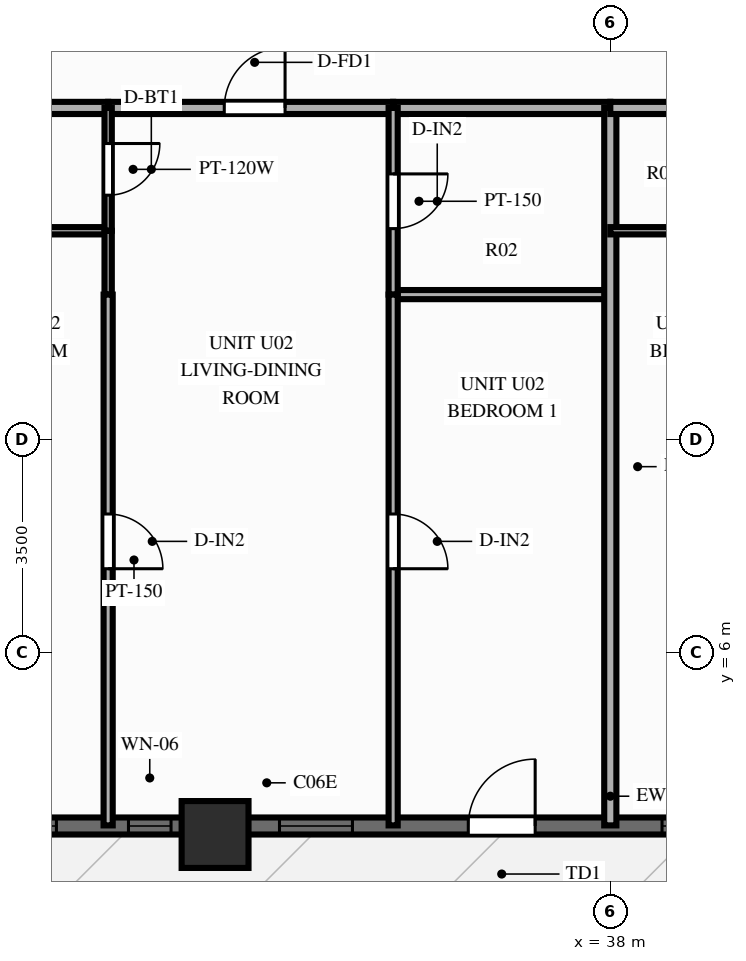
"""IFC4 building model, lengths in metres.
Left out: names, types, materials, properties, quantities, classifications, styles, units other than length and angle.
Written with IfcOpenShell. Run it as: python <this file> out.ifc"""

import sys

from ifc_helpers import new_model, si_unit, direction, frame, frame_2d, origin, origin_2d, place, context, subcontext, project, spatial, rectangle, extrude, source, transform, mapped, element, fill, save


model = new_model("IFC4")
c1 = context("Model", 3, precision=1e-05, world=origin(), true_north=direction((0.0, 1.0)))
c2 = subcontext(c1, "Body", "Model", "MODEL_VIEW")
j1 = project(units=[si_unit("LENGTHUNIT", "METRE"), si_unit("PLANEANGLEUNIT", "RADIAN")], contexts=[c1])
p1 = place(None, origin())
s1 = spatial("IfcSite", under=j1, at=p1, CompositionType="ELEMENT")
p2 = place(p1, origin())
s2 = spatial("IfcBuilding", under=s1, at=p2, CompositionType="ELEMENT")
p3 = place(p2, frame((0.0, 0.0, 43.4)))
s3 = spatial("IfcBuildingStorey", under=s2, at=p3, CompositionType="ELEMENT", Elevation=43.4)
m1 = source(origin(), c2, "Body", "SweptSolid", [
    extrude(rectangle(XDim=1.1, YDim=1.1, at=origin_2d()), origin(), (0.0, 0.0, 1.0), 3.0),
])
p4 = place(p3, frame((31.5, 3.0, 0.0), z_axis=(0.0, 0.0, 1.0), x_axis=(1.0, 0.0, 0.0)))
e1 = element("IfcColumn", 1, at=p4, inside=s3, PredefinedType="COLUMN", context=c2, shape_type="MappedRepresentation", body=[
    mapped(m1, transform((0.0, 0.0, 0.0), scale=1.0)),
])
p5 = place(p3, frame((15.5, 3.14, 0.0), z_axis=(0.0, 0.0, 1.0), x_axis=(1.0, 0.0, 0.0)))
e2 = element("IfcWall", 2, at=p5, inside=s3, PredefinedType="SOLIDWALL", context=c2, shape_type="SweptSolid", body=[
    extrude(rectangle(XDim=45.0, YDim=0.28, at=frame_2d((22.5, 0.0))), origin(), (0.0, 0.0, 1.0), 2.28),
])
p6 = place(p5, frame((1.136, 0.0, 0.25)))
e3 = element("IfcOpeningElement", 3, at=p6, cuts=e2, PredefinedType="OPENING", context=c2, shape_type="SweptSolid", body=[
    extrude(rectangle(XDim=1.2, YDim=1.5, at=frame_2d((0.6, 0.75))), frame((0.0, 0.152, 0.0), z_axis=(0.0, -1.0, 0.0), x_axis=(1.0, 0.0, 0.0)), (0.0, 0.0, 1.0), 0.304),
])
p7 = place(p5, frame((4.825, 0.0, 0.25)))
e4 = element("IfcOpeningElement", 4, at=p7, cuts=e2, PredefinedType="OPENING", context=c2, shape_type="SweptSolid", body=[
    extrude(rectangle(XDim=1.2, YDim=1.5, at=frame_2d((0.6, 0.75))), frame((0.0, 0.152, 0.0), z_axis=(0.0, -1.0, 0.0), x_axis=(1.0, 0.0, 0.0)), (0.0, 0.0, 1.0), 0.304),
])
p8 = place(p5, frame((8.954, 0.0, 0.25)))
e5 = element("IfcOpeningElement", 5, at=p8, cuts=e2, PredefinedType="OPENING", context=c2, shape_type="SweptSolid", body=[
    extrude(rectangle(XDim=1.2, YDim=1.5, at=frame_2d((0.6, 0.75))), frame((0.0, 0.152, 0.0), z_axis=(0.0, -1.0, 0.0), x_axis=(1.0, 0.0, 0.0)), (0.0, 0.0, 1.0), 0.304),
])
p9 = place(p5, frame((12.191, 0.0, 0.25)))
e6 = element("IfcOpeningElement", 6, at=p9, cuts=e2, PredefinedType="OPENING", context=c2, shape_type="SweptSolid", body=[
    extrude(rectangle(XDim=1.2, YDim=1.5, at=frame_2d((0.6, 0.75))), frame((0.0, 0.152, 0.0), z_axis=(0.0, -1.0, 0.0), x_axis=(1.0, 0.0, 0.0)), (0.0, 0.0, 1.0), 0.304),
])
p10 = place(p5, frame((14.576, 0.0, 0.25)))
e7 = element("IfcOpeningElement", 7, at=p10, cuts=e2, PredefinedType="OPENING", context=c2, shape_type="SweptSolid", body=[
    extrude(rectangle(XDim=0.7, YDim=1.5, at=frame_2d((0.35, 0.75))), frame((0.0, 0.152, 0.0), z_axis=(0.0, -1.0, 0.0), x_axis=(1.0, 0.0, 0.0)), (0.0, 0.0, 1.0), 0.304),
])
p11 = place(p5, frame((17.059, 0.0, 0.25)))
e8 = element("IfcOpeningElement", 8, at=p11, cuts=e2, PredefinedType="OPENING", context=c2, shape_type="SweptSolid", body=[
    extrude(rectangle(XDim=1.2, YDim=1.5, at=frame_2d((0.6, 0.75))), frame((0.0, 0.152, 0.0), z_axis=(0.0, -1.0, 0.0), x_axis=(1.0, 0.0, 0.0)), (0.0, 0.0, 1.0), 0.304),
])
p12 = place(p5, frame((21.264, 0.0, 0.0), z_axis=(0.0, 0.0, 1.0), x_axis=(-1.0, 0.0, 0.0)))
e9 = element("IfcOpeningElement", 9, at=p12, cuts=e2, PredefinedType="OPENING", context=c2, shape_type="SweptSolid", body=[
    extrude(rectangle(XDim=1.1, YDim=2.15, at=frame_2d((0.55, 1.075))), frame((0.0, 0.152, 0.0), z_axis=(0.0, -1.0, 0.0), x_axis=(1.0, 0.0, 0.0)), (0.0, 0.0, 1.0), 0.304),
])
p13 = place(p5, frame((23.351, 0.0, 0.25)))
e10 = element("IfcOpeningElement", 10, at=p13, cuts=e2, PredefinedType="OPENING", context=c2, shape_type="SweptSolid", body=[
    extrude(rectangle(XDim=1.2, YDim=1.5, at=frame_2d((0.6, 0.75))), frame((0.0, 0.152, 0.0), z_axis=(0.0, -1.0, 0.0), x_axis=(1.0, 0.0, 0.0)), (0.0, 0.0, 1.0), 0.304),
])
p14 = place(p5, frame((26.406, 0.0, 0.25)))
e11 = element("IfcOpeningElement", 11, at=p14, cuts=e2, PredefinedType="OPENING", context=c2, shape_type="SweptSolid", body=[
    extrude(rectangle(XDim=1.2, YDim=1.5, at=frame_2d((0.6, 0.75))), frame((0.0, 0.152, 0.0), z_axis=(0.0, -1.0, 0.0), x_axis=(1.0, 0.0, 0.0)), (0.0, 0.0, 1.0), 0.304),
])
p15 = place(p5, frame((31.39, 0.0, 0.25)))
e12 = element("IfcOpeningElement", 12, at=p15, cuts=e2, PredefinedType="OPENING", context=c2, shape_type="SweptSolid", body=[
    extrude(rectangle(XDim=1.2, YDim=1.5, at=frame_2d((0.6, 0.75))), frame((0.0, 0.152, 0.0), z_axis=(0.0, -1.0, 0.0), x_axis=(1.0, 0.0, 0.0)), (0.0, 0.0, 1.0), 0.304),
])
p16 = place(p5, frame((34.511, 0.0, 0.25)))
e13 = element("IfcOpeningElement", 13, at=p16, cuts=e2, PredefinedType="OPENING", context=c2, shape_type="SweptSolid", body=[
    extrude(rectangle(XDim=1.2, YDim=1.5, at=frame_2d((0.6, 0.75))), frame((0.0, 0.152, 0.0), z_axis=(0.0, -1.0, 0.0), x_axis=(1.0, 0.0, 0.0)), (0.0, 0.0, 1.0), 0.304),
])
p17 = place(p5, frame((38.305, 0.0, 0.25)))
e14 = element("IfcOpeningElement", 14, at=p17, cuts=e2, PredefinedType="OPENING", context=c2, shape_type="SweptSolid", body=[
    extrude(rectangle(XDim=1.2, YDim=1.5, at=frame_2d((0.6, 0.75))), frame((0.0, 0.152, 0.0), z_axis=(0.0, -1.0, 0.0), x_axis=(1.0, 0.0, 0.0)), (0.0, 0.0, 1.0), 0.304),
])
p18 = place(p5, frame((42.329, 0.0, 0.25)))
e15 = element("IfcOpeningElement", 15, at=p18, cuts=e2, PredefinedType="OPENING", context=c2, shape_type="SweptSolid", body=[
    extrude(rectangle(XDim=1.2, YDim=1.5, at=frame_2d((0.6, 0.75))), frame((0.0, 0.152, 0.0), z_axis=(0.0, -1.0, 0.0), x_axis=(1.0, 0.0, 0.0)), (0.0, 0.0, 1.0), 0.304),
])
p19 = place(p3, frame((26.84, 14.95, 0.0), z_axis=(0.0, 0.0, 1.0), x_axis=(1.0, 0.0, 0.0)))
e16 = element("IfcWall", 16, at=p19, inside=s3, PredefinedType="PARTITIONING", context=c2, shape_type="SweptSolid", body=[
    extrude(rectangle(XDim=2.902, YDim=0.2, at=frame_2d((1.451, 0.0))), origin(), (0.0, 0.0, 1.0), 2.79),
])
p20 = place(p3, frame((29.742, 14.95, 0.0), z_axis=(0.0, 0.0, 1.0), x_axis=(1.0, 0.0, 0.0)))
e17 = element("IfcWall", 17, at=p20, inside=s3, PredefinedType="PARTITIONING", context=c2, shape_type="SweptSolid", body=[
    extrude(rectangle(XDim=4.687, YDim=0.2, at=frame_2d((2.344, 0.0))), origin(), (0.0, 0.0, 1.0), 2.79),
])
p21 = place(p20, frame((1.91, 0.0, 0.0)))
e18 = element("IfcOpeningElement", 18, at=p21, cuts=e17, PredefinedType="OPENING", context=c2, shape_type="SweptSolid", body=[
    extrude(rectangle(XDim=1.0, YDim=2.15, at=frame_2d((0.5, 1.075))), frame((0.0, 0.112, 0.0), z_axis=(0.0, -1.0, 0.0), x_axis=(1.0, 0.0, 0.0)), (0.0, 0.0, 1.0), 0.224),
])
p22 = place(p3, frame((34.429, 14.95, 0.0), z_axis=(0.0, 0.0, 1.0), x_axis=(1.0, 0.0, 0.0)))
e19 = element("IfcWall", 19, at=p22, inside=s3, PredefinedType="PARTITIONING", context=c2, shape_type="SweptSolid", body=[
    extrude(rectangle(XDim=3.571, YDim=0.2, at=frame_2d((1.786, 0.0))), origin(), (0.0, 0.0, 1.0), 2.79),
])
p23 = place(p3, frame((26.84, 12.93, 0.0), z_axis=(0.0, 0.0, 1.0), x_axis=(1.0, 0.0, 0.0)))
e20 = element("IfcWall", 20, at=p23, inside=s3, PredefinedType="PARTITIONING", context=c2, shape_type="SweptSolid", body=[
    extrude(rectangle(XDim=2.902, YDim=0.12, at=frame_2d((1.451, 0.0))), origin(), (0.0, 0.0, 1.0), 2.79),
])
p24 = place(p3, frame((34.429, 11.88, 0.0), z_axis=(0.0, 0.0, 1.0), x_axis=(1.0, 0.0, 0.0)))
e21 = element("IfcWall", 21, at=p24, inside=s3, PredefinedType="PARTITIONING", context=c2, shape_type="SweptSolid", body=[
    extrude(rectangle(XDim=3.571, YDim=0.15, at=frame_2d((1.786, 0.0))), origin(), (0.0, 0.0, 1.0), 2.79),
])
p25 = place(p3, frame((29.742, 14.95, 0.0), z_axis=(0.0, 0.0, 1.0), x_axis=(0.0, -1.0, 0.0)))
e22 = element("IfcWall", 22, at=p25, inside=s3, PredefinedType="PARTITIONING", context=c2, shape_type="SweptSolid", body=[
    extrude(rectangle(XDim=2.02, YDim=0.12, at=frame_2d((1.01, 0.0))), origin(), (0.0, 0.0, 1.0), 2.79),
])
p26 = place(p25, frame((0.585, 0.0, 0.0)))
e23 = element("IfcOpeningElement", 23, at=p26, cuts=e22, PredefinedType="OPENING", context=c2, shape_type="SweptSolid", body=[
    extrude(rectangle(XDim=0.85, YDim=2.05, at=frame_2d((0.425, 1.025))), frame((0.0, 0.072, 0.0), z_axis=(0.0, -1.0, 0.0), x_axis=(1.0, 0.0, 0.0)), (0.0, 0.0, 1.0), 0.144),
])
p27 = place(p3, frame((29.742, 12.93, 0.0), z_axis=(0.0, 0.0, 1.0), x_axis=(0.0, -1.0, 0.0)))
e24 = element("IfcWall", 24, at=p27, inside=s3, PredefinedType="PARTITIONING", context=c2, shape_type="SweptSolid", body=[
    extrude(rectangle(XDim=1.05, YDim=0.12, at=frame_2d((0.525, 0.0))), origin(), (0.0, 0.0, 1.0), 2.79),
])
p28 = place(p3, frame((29.742, 11.88, 0.0), z_axis=(0.0, 0.0, 1.0), x_axis=(0.0, -1.0, 0.0)))
e25 = element("IfcWall", 25, at=p28, inside=s3, PredefinedType="PARTITIONING", context=c2, shape_type="SweptSolid", body=[
    extrude(rectangle(XDim=8.73, YDim=0.15, at=frame_2d((4.365, 0.0))), origin(), (0.0, 0.0, 1.0), 2.79),
])
p29 = place(p28, frame((3.609, 0.0, 0.0)))
e26 = element("IfcOpeningElement", 26, at=p29, cuts=e25, PredefinedType="OPENING", context=c2, shape_type="SweptSolid", body=[
    extrude(rectangle(XDim=0.9, YDim=2.1, at=frame_2d((0.45, 1.05))), frame((0.0, 0.087, 0.0), z_axis=(0.0, -1.0, 0.0), x_axis=(1.0, 0.0, 0.0)), (0.0, 0.0, 1.0), 0.174),
])
p30 = place(p3, frame((34.429, 14.95, 0.0), z_axis=(0.0, 0.0, 1.0), x_axis=(0.0, -1.0, 0.0)))
e27 = element("IfcWall", 27, at=p30, inside=s3, PredefinedType="PARTITIONING", context=c2, shape_type="SweptSolid", body=[
    extrude(rectangle(XDim=3.07, YDim=0.15, at=frame_2d((1.535, 0.0))), origin(), (0.0, 0.0, 1.0), 2.79),
])
p31 = place(p30, frame((1.085, 0.0, 0.0)))
e28 = element("IfcOpeningElement", 28, at=p31, cuts=e27, PredefinedType="OPENING", context=c2, shape_type="SweptSolid", body=[
    extrude(rectangle(XDim=0.9, YDim=2.1, at=frame_2d((0.45, 1.05))), frame((0.0, 0.087, 0.0), z_axis=(0.0, -1.0, 0.0), x_axis=(1.0, 0.0, 0.0)), (0.0, 0.0, 1.0), 0.174),
])
p32 = place(p3, frame((34.429, 11.88, 0.0), z_axis=(0.0, 0.0, 1.0), x_axis=(0.0, -1.0, 0.0)))
e29 = element("IfcWall", 29, at=p32, inside=s3, PredefinedType="PARTITIONING", context=c2, shape_type="SweptSolid", body=[
    extrude(rectangle(XDim=8.73, YDim=0.15, at=frame_2d((4.365, 0.0))), origin(), (0.0, 0.0, 1.0), 2.79),
])
p33 = place(p32, frame((3.609, 0.0, 0.0)))
e30 = element("IfcOpeningElement", 30, at=p33, cuts=e29, PredefinedType="OPENING", context=c2, shape_type="SweptSolid", body=[
    extrude(rectangle(XDim=0.9, YDim=2.1, at=frame_2d((0.45, 1.05))), frame((0.0, 0.087, 0.0), z_axis=(0.0, -1.0, 0.0), x_axis=(1.0, 0.0, 0.0)), (0.0, 0.0, 1.0), 0.174),
])
p34 = place(p3, frame((38.0, 14.95, 0.0), z_axis=(0.0, 0.0, 1.0), x_axis=(0.0, -1.0, 0.0)))
e31 = element("IfcWall", 31, at=p34, inside=s3, PredefinedType="PARTITIONING", context=c2, shape_type="SweptSolid", body=[
    extrude(rectangle(XDim=11.8, YDim=0.2, at=frame_2d((5.9, 0.0))), origin(), (0.0, 0.0, 1.0), 2.79),
])
p35 = place(p3, frame((38.0, 14.95, 0.0), z_axis=(0.0, 0.0, 1.0), x_axis=(1.0, 0.0, 0.0)))
e32 = element("IfcWall", 32, at=p35, inside=s3, PredefinedType="PARTITIONING", context=c2, shape_type="SweptSolid", body=[
    extrude(rectangle(XDim=2.902, YDim=0.2, at=frame_2d((1.451, 0.0))), origin(), (0.0, 0.0, 1.0), 2.79),
])
p36 = place(p3, frame((38.0, 12.93, 0.0), z_axis=(0.0, 0.0, 1.0), x_axis=(1.0, 0.0, 0.0)))
e33 = element("IfcWall", 33, at=p36, inside=s3, PredefinedType="PARTITIONING", context=c2, shape_type="SweptSolid", body=[
    extrude(rectangle(XDim=2.902, YDim=0.12, at=frame_2d((1.451, 0.0))), origin(), (0.0, 0.0, 1.0), 2.79),
])
m2 = source(origin(), c2, "Body", "SweptSolid", [
    extrude(rectangle(XDim=1.2, YDim=1.5, at=frame_2d((0.6, 0.75))), frame((0.0, 0.03, 0.0), z_axis=(0.0, -1.0, 0.0), x_axis=(1.0, 0.0, 0.0)), (0.0, 0.0, 1.0), 0.06),
])
p37 = place(p9, origin())
e34 = element("IfcWindow", 34, at=p37, inside=s3, PartitioningType="SINGLE_PANEL", PredefinedType="WINDOW", context=c2, shape_type="MappedRepresentation", body=[
    mapped(m2, transform((0.0, 0.0, 0.0), scale=1.0)),
])
fill(e6, e34)
m3 = source(origin(), c2, "Body", "SweptSolid", [
    extrude(rectangle(XDim=0.7, YDim=1.5, at=frame_2d((0.35, 0.75))), frame((0.0, 0.03, 0.0), z_axis=(0.0, -1.0, 0.0), x_axis=(1.0, 0.0, 0.0)), (0.0, 0.0, 1.0), 0.06),
])
p38 = place(p10, origin())
e35 = element("IfcWindow", 35, at=p38, inside=s3, PartitioningType="SINGLE_PANEL", PredefinedType="WINDOW", context=c2, shape_type="MappedRepresentation", body=[
    mapped(m3, transform((0.0, 0.0, 0.0), scale=1.0)),
])
fill(e7, e35)
p39 = place(p11, origin())
e36 = element("IfcWindow", 36, at=p39, inside=s3, PartitioningType="SINGLE_PANEL", PredefinedType="WINDOW", context=c2, shape_type="MappedRepresentation", body=[
    mapped(m2, transform((0.0, 0.0, 0.0), scale=1.0)),
])
fill(e8, e36)
m4 = source(origin(), c2, "Body", "SweptSolid", [
    extrude(rectangle(XDim=1.1, YDim=2.15, at=frame_2d((0.55, 1.075))), frame((0.0, 0.025, 0.0), z_axis=(0.0, -1.0, 0.0), x_axis=(1.0, 0.0, 0.0)), (0.0, 0.0, 1.0), 0.05),
])
p40 = place(p12, origin())
e37 = element("IfcDoor", 37, at=p40, inside=s3, OperationType="SINGLE_SWING_LEFT", PredefinedType="DOOR", context=c2, shape_type="MappedRepresentation", body=[
    mapped(m4, transform((0.0, 0.0, 0.0), scale=1.0)),
])
fill(e9, e37)
p41 = place(p13, origin())
e38 = element("IfcWindow", 38, at=p41, inside=s3, PartitioningType="SINGLE_PANEL", PredefinedType="WINDOW", context=c2, shape_type="MappedRepresentation", body=[
    mapped(m2, transform((0.0, 0.0, 0.0), scale=1.0)),
])
fill(e10, e38)
m5 = source(origin(), c2, "Body", "SweptSolid", [
    extrude(rectangle(XDim=1.0, YDim=2.15, at=frame_2d((0.5, 1.075))), frame((0.0, 0.025, 0.0), z_axis=(0.0, -1.0, 0.0), x_axis=(1.0, 0.0, 0.0)), (0.0, 0.0, 1.0), 0.05),
])
p42 = place(p21, origin())
e39 = element("IfcDoor", 39, at=p42, inside=s3, OperationType="SINGLE_SWING_RIGHT", PredefinedType="DOOR", context=c2, shape_type="MappedRepresentation", body=[
    mapped(m5, transform((0.0, 0.0, 0.0), scale=1.0)),
])
fill(e18, e39)
m6 = source(origin(), c2, "Body", "SweptSolid", [
    extrude(rectangle(XDim=0.85, YDim=2.05, at=frame_2d((0.425, 1.025))), frame((0.0, 0.025, 0.0), z_axis=(0.0, -1.0, 0.0), x_axis=(1.0, 0.0, 0.0)), (0.0, 0.0, 1.0), 0.05),
])
p43 = place(p26, origin())
e40 = element("IfcDoor", 40, at=p43, inside=s3, OperationType="SINGLE_SWING_LEFT", PredefinedType="DOOR", context=c2, shape_type="MappedRepresentation", body=[
    mapped(m6, transform((0.0, 0.0, 0.0), scale=1.0)),
])
fill(e23, e40)
m7 = source(origin(), c2, "Body", "SweptSolid", [
    extrude(rectangle(XDim=0.9, YDim=2.1, at=frame_2d((0.45, 1.05))), frame((0.0, 0.025, 0.0), z_axis=(0.0, -1.0, 0.0), x_axis=(1.0, 0.0, 0.0)), (0.0, 0.0, 1.0), 0.05),
])
p44 = place(p29, origin())
e41 = element("IfcDoor", 41, at=p44, inside=s3, OperationType="SINGLE_SWING_RIGHT", PredefinedType="DOOR", context=c2, shape_type="MappedRepresentation", body=[
    mapped(m7, transform((0.0, 0.0, 0.0), scale=1.0)),
])
fill(e26, e41)
p45 = place(p31, origin())
e42 = element("IfcDoor", 42, at=p45, inside=s3, OperationType="SINGLE_SWING_LEFT", PredefinedType="DOOR", context=c2, shape_type="MappedRepresentation", body=[
    mapped(m7, transform((0.0, 0.0, 0.0), scale=1.0)),
])
fill(e28, e42)
p46 = place(p33, origin())
e43 = element("IfcDoor", 43, at=p46, inside=s3, OperationType="SINGLE_SWING_RIGHT", PredefinedType="DOOR", context=c2, shape_type="MappedRepresentation", body=[
    mapped(m7, transform((0.0, 0.0, 0.0), scale=1.0)),
])
fill(e30, e43)
save(model, sys.argv[1])
